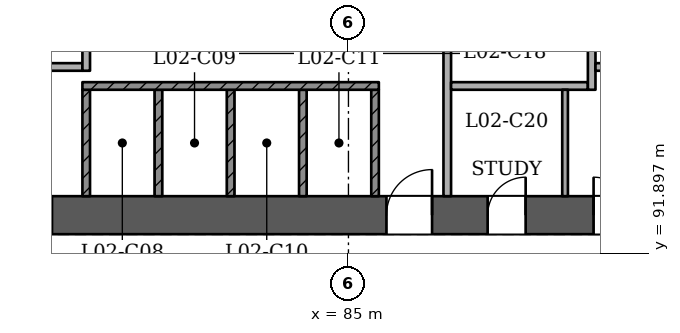
"""IFC4 building model, lengths in metres.
Left out: names, types, materials, properties, quantities, classifications, styles, units other than length and angle.
Written with IfcOpenShell. Run it as: python <this file> out.ifc"""

import sys

from ifc_helpers import new_model, si_unit, direction, frame, frame_2d, origin, place, context, subcontext, project, spatial, rectangle, extrude, element, fill, save


model = new_model("IFC4")
c1 = context("Model", 3, precision=1e-05, world=origin(), true_north=direction((0.0, 1.0)))
c2 = subcontext(c1, "Body", "Model", "MODEL_VIEW")
j1 = project(units=[si_unit("LENGTHUNIT", "METRE"), si_unit("PLANEANGLEUNIT", "RADIAN")], contexts=[c1])
p1 = place(None, origin())
s1 = spatial("IfcSite", under=j1, at=p1, CompositionType="ELEMENT")
p2 = place(p1, origin())
s2 = spatial("IfcBuilding", under=s1, at=p2, CompositionType="ELEMENT")
p3 = place(p2, frame((0.0, 0.0, 13.5)))
s3 = spatial("IfcBuildingStorey", under=s2, at=p3, CompositionType="ELEMENT", Elevation=13.5)
p4 = place(p3, frame((72.5, 92.9, 0.0), z_axis=(0.0, 0.0, 1.0), x_axis=(1.0, 0.0, 0.0)))
e1 = element("IfcWall", 1, at=p4, inside=s3, PredefinedType="SHEAR", context=c2, shape_type="SweptSolid", body=[
    extrude(rectangle(XDim=25.5, YDim=1.0, at=frame_2d((12.75, 0.0))), origin(), (0.0, 0.0, 1.0), 4.5),
])
p5 = place(p4, frame((1.3, 0.0, 0.0)))
e2 = element("IfcOpeningElement", 2, at=p5, cuts=e1, PredefinedType="OPENING", context=c2, shape_type="SweptSolid", body=[
    extrude(rectangle(XDim=1.2, YDim=2.1, at=frame_2d((0.6, 1.05))), frame((0.0, 0.51, 0.0), z_axis=(0.0, -1.0, 0.0), x_axis=(1.0, 0.0, 0.0)), (0.0, 0.0, 1.0), 1.021),
])
p6 = place(p4, frame((3.5, 0.0, 0.0)))
e3 = element("IfcOpeningElement", 3, at=p6, cuts=e1, PredefinedType="OPENING", context=c2, shape_type="SweptSolid", body=[
    extrude(rectangle(XDim=1.2, YDim=2.1, at=frame_2d((0.6, 1.05))), frame((0.0, 0.51, 0.0), z_axis=(0.0, -1.0, 0.0), x_axis=(1.0, 0.0, 0.0)), (0.0, 0.0, 1.0), 1.021),
])
p7 = place(p4, frame((13.5, 0.0, 0.0)))
e4 = element("IfcOpeningElement", 4, at=p7, cuts=e1, PredefinedType="OPENING", context=c2, shape_type="SweptSolid", body=[
    extrude(rectangle(XDim=1.2, YDim=2.1, at=frame_2d((0.6, 1.05))), frame((0.0, 0.51, 0.0), z_axis=(0.0, -1.0, 0.0), x_axis=(1.0, 0.0, 0.0)), (0.0, 0.0, 1.0), 1.021),
])
p8 = place(p4, frame((16.163, 0.0, 0.0)))
e5 = element("IfcOpeningElement", 5, at=p8, cuts=e1, PredefinedType="OPENING", context=c2, shape_type="SweptSolid", body=[
    extrude(rectangle(XDim=1.0, YDim=2.1, at=frame_2d((0.5, 1.05))), frame((0.0, 0.51, 0.0), z_axis=(0.0, -1.0, 0.0), x_axis=(1.0, 0.0, 0.0)), (0.0, 0.0, 1.0), 1.021),
])
p9 = place(p4, frame((18.95, 0.0, 0.0)))
e6 = element("IfcOpeningElement", 6, at=p9, cuts=e1, PredefinedType="OPENING", context=c2, shape_type="SweptSolid", body=[
    extrude(rectangle(XDim=1.0, YDim=2.1, at=frame_2d((0.5, 1.05))), frame((0.0, 0.51, 0.0), z_axis=(0.0, -1.0, 0.0), x_axis=(1.0, 0.0, 0.0)), (0.0, 0.0, 1.0), 1.021),
])
p10 = place(p4, frame((22.137, 0.0, 0.0)))
e7 = element("IfcOpeningElement", 7, at=p10, cuts=e1, PredefinedType="OPENING", context=c2, shape_type="SweptSolid", body=[
    extrude(rectangle(XDim=1.0, YDim=2.1, at=frame_2d((0.5, 1.05))), frame((0.0, 0.51, 0.0), z_axis=(0.0, -1.0, 0.0), x_axis=(1.0, 0.0, 0.0)), (0.0, 0.0, 1.0), 1.021),
])
p11 = place(p3, frame((55.57, 95.474, 0.0), z_axis=(0.0, 0.0, 1.0), x_axis=(0.500000085768, -0.866025354266, 0.0)))
e8 = element("IfcWall", 8, at=p11, inside=s3, PredefinedType="PARTITIONING", context=c2, shape_type="SweptSolid", body=[
    extrude(rectangle(XDim=55.365, YDim=0.15, at=frame_2d((27.682, 0.0))), origin(), (0.0, 0.0, 1.0), 4.05),
])
p12 = place(p11, frame((6.832, 0.0, 0.0)))
e9 = element("IfcOpeningElement", 9, at=p12, cuts=e8, PredefinedType="OPENING", context=c2, shape_type="SweptSolid", body=[
    extrude(rectangle(XDim=1.2, YDim=2.1, at=frame_2d((0.6, 1.05))), frame((0.0, 0.085, 0.0), z_axis=(0.0, -1.0, 0.0), x_axis=(1.0, 0.0, 0.0)), (0.0, 0.0, 1.0), 0.171),
])
p13 = place(p11, frame((14.626, 0.0, 0.0)))
e10 = element("IfcOpeningElement", 10, at=p13, cuts=e8, PredefinedType="OPENING", context=c2, shape_type="SweptSolid", body=[
    extrude(rectangle(XDim=0.9, YDim=2.1, at=frame_2d((0.45, 1.05))), frame((0.0, 0.085, 0.0), z_axis=(0.0, -1.0, 0.0), x_axis=(1.0, 0.0, 0.0)), (0.0, 0.0, 1.0), 0.171),
])
p14 = place(p11, frame((16.876, 0.0, 0.0)))
e11 = element("IfcOpeningElement", 11, at=p14, cuts=e8, PredefinedType="OPENING", context=c2, shape_type="SweptSolid", body=[
    extrude(rectangle(XDim=0.9, YDim=2.1, at=frame_2d((0.45, 1.05))), frame((0.0, 0.085, 0.0), z_axis=(0.0, -1.0, 0.0), x_axis=(1.0, 0.0, 0.0)), (0.0, 0.0, 1.0), 0.171),
])
p15 = place(p11, frame((24.832, 0.0, 0.0)))
e12 = element("IfcOpeningElement", 12, at=p15, cuts=e8, PredefinedType="OPENING", context=c2, shape_type="SweptSolid", body=[
    extrude(rectangle(XDim=1.2, YDim=2.1, at=frame_2d((0.6, 1.05))), frame((0.0, 0.085, 0.0), z_axis=(0.0, -1.0, 0.0), x_axis=(1.0, 0.0, 0.0)), (0.0, 0.0, 1.0), 0.171),
])
p16 = place(p11, frame((36.082, 0.0, 0.0)))
e13 = element("IfcOpeningElement", 13, at=p16, cuts=e8, PredefinedType="OPENING", context=c2, shape_type="SweptSolid", body=[
    extrude(rectangle(XDim=1.2, YDim=2.1, at=frame_2d((0.6, 1.05))), frame((0.0, 0.085, 0.0), z_axis=(0.0, -1.0, 0.0), x_axis=(1.0, 0.0, 0.0)), (0.0, 0.0, 1.0), 0.171),
])
p17 = place(p11, frame((45.082, 0.0, 0.0)))
e14 = element("IfcOpeningElement", 14, at=p17, cuts=e8, PredefinedType="OPENING", context=c2, shape_type="SweptSolid", body=[
    extrude(rectangle(XDim=1.2, YDim=2.1, at=frame_2d((0.6, 1.05))), frame((0.0, 0.085, 0.0), z_axis=(0.0, -1.0, 0.0), x_axis=(1.0, 0.0, 0.0)), (0.0, 0.0, 1.0), 0.171),
])
p18 = place(p11, frame((53.295, 0.0, 0.0)))
e15 = element("IfcOpeningElement", 15, at=p18, cuts=e8, PredefinedType="OPENING", context=c2, shape_type="SweptSolid", body=[
    extrude(rectangle(XDim=1.0, YDim=2.1, at=frame_2d((0.5, 1.05))), frame((0.0, 0.085, 0.0), z_axis=(0.0, -1.0, 0.0), x_axis=(1.0, 0.0, 0.0)), (0.0, 0.0, 1.0), 0.171),
])
p19 = place(p3, frame((86.747, 47.526, 0.0), z_axis=(0.0, 0.0, 1.0), x_axis=(0.500000085768, 0.866025354266, 0.0)))
e16 = element("IfcWall", 16, at=p19, inside=s3, PredefinedType="PARTITIONING", context=c2, shape_type="SweptSolid", body=[
    extrude(rectangle(XDim=55.365, YDim=0.15, at=frame_2d((27.682, 0.0))), origin(), (0.0, 0.0, 1.0), 4.05),
])
p20 = place(p19, frame((0.97, 0.0, 0.0)))
e17 = element("IfcOpeningElement", 17, at=p20, cuts=e16, PredefinedType="OPENING", context=c2, shape_type="SweptSolid", body=[
    extrude(rectangle(XDim=1.2, YDim=2.1, at=frame_2d((0.6, 1.05))), frame((0.0, 0.085, 0.0), z_axis=(0.0, -1.0, 0.0), x_axis=(1.0, 0.0, 0.0)), (0.0, 0.0, 1.0), 0.171),
])
p21 = place(p19, frame((11.332, 0.0, 0.0)))
e18 = element("IfcOpeningElement", 18, at=p21, cuts=e16, PredefinedType="OPENING", context=c2, shape_type="SweptSolid", body=[
    extrude(rectangle(XDim=1.2, YDim=2.1, at=frame_2d((0.6, 1.05))), frame((0.0, 0.085, 0.0), z_axis=(0.0, -1.0, 0.0), x_axis=(1.0, 0.0, 0.0)), (0.0, 0.0, 1.0), 0.171),
])
p22 = place(p19, frame((29.332, 0.0, 0.0)))
e19 = element("IfcOpeningElement", 19, at=p22, cuts=e16, PredefinedType="OPENING", context=c2, shape_type="SweptSolid", body=[
    extrude(rectangle(XDim=1.2, YDim=2.1, at=frame_2d((0.6, 1.05))), frame((0.0, 0.085, 0.0), z_axis=(0.0, -1.0, 0.0), x_axis=(1.0, 0.0, 0.0)), (0.0, 0.0, 1.0), 0.171),
])
p23 = place(p19, frame((42.132, 0.0, 0.0)))
e20 = element("IfcOpeningElement", 20, at=p23, cuts=e16, PredefinedType="OPENING", context=c2, shape_type="SweptSolid", body=[
    extrude(rectangle(XDim=1.2, YDim=2.1, at=frame_2d((0.6, 1.05))), frame((0.0, 0.085, 0.0), z_axis=(0.0, -1.0, 0.0), x_axis=(1.0, 0.0, 0.0)), (0.0, 0.0, 1.0), 0.171),
])
p24 = place(p19, frame((46.569, 0.0, 0.0)))
e21 = element("IfcOpeningElement", 21, at=p24, cuts=e16, PredefinedType="OPENING", context=c2, shape_type="SweptSolid", body=[
    extrude(rectangle(XDim=1.0, YDim=2.1, at=frame_2d((0.5, 1.05))), frame((0.0, 0.085, 0.0), z_axis=(0.0, -1.0, 0.0), x_axis=(1.0, 0.0, 0.0)), (0.0, 0.0, 1.0), 0.171),
])
p25 = place(p19, frame((48.819, 0.0, 0.0)))
e22 = element("IfcOpeningElement", 22, at=p25, cuts=e16, PredefinedType="OPENING", context=c2, shape_type="SweptSolid", body=[
    extrude(rectangle(XDim=1.0, YDim=2.1, at=frame_2d((0.5, 1.05))), frame((0.0, 0.085, 0.0), z_axis=(0.0, -1.0, 0.0), x_axis=(1.0, 0.0, 0.0)), (0.0, 0.0, 1.0), 0.171),
])
p26 = place(p19, frame((51.837, 0.0, 0.0)))
e23 = element("IfcOpeningElement", 23, at=p26, cuts=e16, PredefinedType="OPENING", context=c2, shape_type="SweptSolid", body=[
    extrude(rectangle(XDim=1.2, YDim=2.1, at=frame_2d((0.6, 1.05))), frame((0.0, 0.085, 0.0), z_axis=(0.0, -1.0, 0.0), x_axis=(1.0, 0.0, 0.0)), (0.0, 0.0, 1.0), 0.171),
])
p27 = place(p3, frame((79.673, 41.126, 0.0), z_axis=(0.0, 0.0, 1.0), x_axis=(-0.499997306052, 0.866026959131, 0.0)))
e24 = element("IfcWall", 24, at=p27, inside=s3, PredefinedType="SOLIDWALL", context=c2, shape_type="SweptSolid", body=[
    extrude(rectangle(XDim=62.87, YDim=0.4, at=frame_2d((31.435, 0.0))), origin(), (0.0, 0.0, 1.0), 4.05),
])
p28 = place(p27, frame((54.986, 0.0, 0.9)))
e25 = element("IfcOpeningElement", 25, at=p28, cuts=e24, PredefinedType="OPENING", context=c2, shape_type="SweptSolid", body=[
    extrude(rectangle(XDim=2.4, YDim=1.5, at=frame_2d((1.2, 0.75))), frame((0.0, 0.21, 0.0), z_axis=(0.0, -1.0, 0.0), x_axis=(1.0, 0.0, 0.0)), (0.0, 0.0, 1.0), 0.421),
])
p29 = place(p27, frame((50.486, 0.0, 0.9)))
e26 = element("IfcOpeningElement", 26, at=p29, cuts=e24, PredefinedType="OPENING", context=c2, shape_type="SweptSolid", body=[
    extrude(rectangle(XDim=2.4, YDim=1.5, at=frame_2d((1.2, 0.75))), frame((0.0, 0.21, 0.0), z_axis=(0.0, -1.0, 0.0), x_axis=(1.0, 0.0, 0.0)), (0.0, 0.0, 1.0), 0.421),
])
p30 = place(p27, frame((45.986, 0.0, 0.9)))
e27 = element("IfcOpeningElement", 27, at=p30, cuts=e24, PredefinedType="OPENING", context=c2, shape_type="SweptSolid", body=[
    extrude(rectangle(XDim=2.4, YDim=1.5, at=frame_2d((1.2, 0.75))), frame((0.0, 0.21, 0.0), z_axis=(0.0, -1.0, 0.0), x_axis=(1.0, 0.0, 0.0)), (0.0, 0.0, 1.0), 0.421),
])
p31 = place(p27, frame((32.486, 0.0, 0.9)))
e28 = element("IfcOpeningElement", 28, at=p31, cuts=e24, PredefinedType="OPENING", context=c2, shape_type="SweptSolid", body=[
    extrude(rectangle(XDim=2.4, YDim=1.5, at=frame_2d((1.2, 0.75))), frame((0.0, 0.21, 0.0), z_axis=(0.0, -1.0, 0.0), x_axis=(1.0, 0.0, 0.0)), (0.0, 0.0, 1.0), 0.421),
])
p32 = place(p27, frame((27.986, 0.0, 0.9)))
e29 = element("IfcOpeningElement", 29, at=p32, cuts=e24, PredefinedType="OPENING", context=c2, shape_type="SweptSolid", body=[
    extrude(rectangle(XDim=2.4, YDim=1.5, at=frame_2d((1.2, 0.75))), frame((0.0, 0.21, 0.0), z_axis=(0.0, -1.0, 0.0), x_axis=(1.0, 0.0, 0.0)), (0.0, 0.0, 1.0), 0.421),
])
p33 = place(p27, frame((23.486, 0.0, 0.9)))
e30 = element("IfcOpeningElement", 30, at=p33, cuts=e24, PredefinedType="OPENING", context=c2, shape_type="SweptSolid", body=[
    extrude(rectangle(XDim=2.4, YDim=1.5, at=frame_2d((1.2, 0.75))), frame((0.0, 0.21, 0.0), z_axis=(0.0, -1.0, 0.0), x_axis=(1.0, 0.0, 0.0)), (0.0, 0.0, 1.0), 0.421),
])
p34 = place(p27, frame((18.986, 0.0, 0.9)))
e31 = element("IfcOpeningElement", 31, at=p34, cuts=e24, PredefinedType="OPENING", context=c2, shape_type="SweptSolid", body=[
    extrude(rectangle(XDim=2.4, YDim=1.5, at=frame_2d((1.2, 0.75))), frame((0.0, 0.21, 0.0), z_axis=(0.0, -1.0, 0.0), x_axis=(1.0, 0.0, 0.0)), (0.0, 0.0, 1.0), 0.421),
])
p35 = place(p27, frame((14.486, 0.0, 0.9)))
e32 = element("IfcOpeningElement", 32, at=p35, cuts=e24, PredefinedType="OPENING", context=c2, shape_type="SweptSolid", body=[
    extrude(rectangle(XDim=2.4, YDim=1.5, at=frame_2d((1.2, 0.75))), frame((0.0, 0.21, 0.0), z_axis=(0.0, -1.0, 0.0), x_axis=(1.0, 0.0, 0.0)), (0.0, 0.0, 1.0), 0.421),
])
p36 = place(p3, frame((121.762, 95.574, 0.0), z_axis=(0.0, 0.0, 1.0), x_axis=(-0.499997306052, -0.866026959131, 0.0)))
e33 = element("IfcWall", 33, at=p36, inside=s3, PredefinedType="SOLIDWALL", context=c2, shape_type="SweptSolid", body=[
    extrude(rectangle(XDim=62.87, YDim=0.4, at=frame_2d((31.435, 0.0))), origin(), (0.0, 0.0, 1.0), 4.05),
])
p37 = place(p36, frame((59.452, 0.0, 0.9)))
e34 = element("IfcOpeningElement", 34, at=p37, cuts=e33, PredefinedType="OPENING", context=c2, shape_type="SweptSolid", body=[
    extrude(rectangle(XDim=2.4, YDim=1.5, at=frame_2d((1.2, 0.75))), frame((0.0, 0.21, 0.0), z_axis=(0.0, -1.0, 0.0), x_axis=(1.0, 0.0, 0.0)), (0.0, 0.0, 1.0), 0.421),
])
p38 = place(p36, frame((54.986, 0.0, 0.9)))
e35 = element("IfcOpeningElement", 35, at=p38, cuts=e33, PredefinedType="OPENING", context=c2, shape_type="SweptSolid", body=[
    extrude(rectangle(XDim=2.4, YDim=1.5, at=frame_2d((1.2, 0.75))), frame((0.0, 0.21, 0.0), z_axis=(0.0, -1.0, 0.0), x_axis=(1.0, 0.0, 0.0)), (0.0, 0.0, 1.0), 0.421),
])
p39 = place(p36, frame((50.486, 0.0, 0.9)))
e36 = element("IfcOpeningElement", 36, at=p39, cuts=e33, PredefinedType="OPENING", context=c2, shape_type="SweptSolid", body=[
    extrude(rectangle(XDim=2.4, YDim=1.5, at=frame_2d((1.2, 0.75))), frame((0.0, 0.21, 0.0), z_axis=(0.0, -1.0, 0.0), x_axis=(1.0, 0.0, 0.0)), (0.0, 0.0, 1.0), 0.421),
])
p40 = place(p36, frame((45.986, 0.0, 0.9)))
e37 = element("IfcOpeningElement", 37, at=p40, cuts=e33, PredefinedType="OPENING", context=c2, shape_type="SweptSolid", body=[
    extrude(rectangle(XDim=2.4, YDim=1.5, at=frame_2d((1.2, 0.75))), frame((0.0, 0.21, 0.0), z_axis=(0.0, -1.0, 0.0), x_axis=(1.0, 0.0, 0.0)), (0.0, 0.0, 1.0), 0.421),
])
p41 = place(p36, frame((41.486, 0.0, 0.9)))
e38 = element("IfcOpeningElement", 38, at=p41, cuts=e33, PredefinedType="OPENING", context=c2, shape_type="SweptSolid", body=[
    extrude(rectangle(XDim=2.4, YDim=1.5, at=frame_2d((1.2, 0.75))), frame((0.0, 0.21, 0.0), z_axis=(0.0, -1.0, 0.0), x_axis=(1.0, 0.0, 0.0)), (0.0, 0.0, 1.0), 0.421),
])
p42 = place(p36, frame((36.986, 0.0, 0.9)))
e39 = element("IfcOpeningElement", 39, at=p42, cuts=e33, PredefinedType="OPENING", context=c2, shape_type="SweptSolid", body=[
    extrude(rectangle(XDim=2.4, YDim=1.5, at=frame_2d((1.2, 0.75))), frame((0.0, 0.21, 0.0), z_axis=(0.0, -1.0, 0.0), x_axis=(1.0, 0.0, 0.0)), (0.0, 0.0, 1.0), 0.421),
])
p43 = place(p36, frame((23.486, 0.0, 0.9)))
e40 = element("IfcOpeningElement", 40, at=p43, cuts=e33, PredefinedType="OPENING", context=c2, shape_type="SweptSolid", body=[
    extrude(rectangle(XDim=2.4, YDim=1.5, at=frame_2d((1.2, 0.75))), frame((0.0, 0.21, 0.0), z_axis=(0.0, -1.0, 0.0), x_axis=(1.0, 0.0, 0.0)), (0.0, 0.0, 1.0), 0.421),
])
p44 = place(p36, frame((18.986, 0.0, 0.9)))
e41 = element("IfcOpeningElement", 41, at=p44, cuts=e33, PredefinedType="OPENING", context=c2, shape_type="SweptSolid", body=[
    extrude(rectangle(XDim=2.4, YDim=1.5, at=frame_2d((1.2, 0.75))), frame((0.0, 0.21, 0.0), z_axis=(0.0, -1.0, 0.0), x_axis=(1.0, 0.0, 0.0)), (0.0, 0.0, 1.0), 0.421),
])
p45 = place(p36, frame((14.486, 0.0, 0.9)))
e42 = element("IfcOpeningElement", 42, at=p45, cuts=e33, PredefinedType="OPENING", context=c2, shape_type="SweptSolid", body=[
    extrude(rectangle(XDim=2.4, YDim=1.5, at=frame_2d((1.2, 0.75))), frame((0.0, 0.21, 0.0), z_axis=(0.0, -1.0, 0.0), x_axis=(1.0, 0.0, 0.0)), (0.0, 0.0, 1.0), 0.421),
])
p46 = place(p36, frame((5.486, 0.0, 0.9)))
e43 = element("IfcOpeningElement", 43, at=p46, cuts=e33, PredefinedType="OPENING", context=c2, shape_type="SweptSolid", body=[
    extrude(rectangle(XDim=2.4, YDim=1.5, at=frame_2d((1.2, 0.75))), frame((0.0, 0.21, 0.0), z_axis=(0.0, -1.0, 0.0), x_axis=(1.0, 0.0, 0.0)), (0.0, 0.0, 1.0), 0.421),
])
p47 = place(p36, frame((1.018, 0.0, 0.9)))
e44 = element("IfcOpeningElement", 44, at=p47, cuts=e33, PredefinedType="OPENING", context=c2, shape_type="SweptSolid", body=[
    extrude(rectangle(XDim=2.4, YDim=1.5, at=frame_2d((1.2, 0.75))), frame((0.0, 0.21, 0.0), z_axis=(0.0, -1.0, 0.0), x_axis=(1.0, 0.0, 0.0)), (0.0, 0.0, 1.0), 0.421),
])
for number, where, z_axis, x_axis in (
    (45, (78.1, 93.4, 0.0), (0.0, 0.0, 1.0), (0.0, 1.0, 0.0)),
    (46, (80.0, 93.4, 0.0), (0.0, 0.0, 1.0), (0.0, 1.0, 0.0)),
    (47, (81.9, 93.4, 0.0), (0.0, 0.0, 1.0), (0.0, 1.0, 0.0)),
    (48, (83.8, 93.4, 0.0), (0.0, 0.0, 1.0), (0.0, 1.0, 0.0)),
    (49, (85.7, 93.4, 0.0), (0.0, 0.0, 1.0), (0.0, 1.0, 0.0)),
):
    element("IfcWall", number, at=place(p3, frame(where, z_axis=z_axis, x_axis=x_axis)), inside=s3, PredefinedType="SOLIDWALL", context=c2, shape_type="SweptSolid", body=[
        extrude(rectangle(XDim=2.8, YDim=0.2, at=frame_2d((1.4, 0.0))), origin(), (0.0, 0.0, 1.0), 4.05),
    ])
p48 = place(p3, frame((87.6, 93.4, 0.0), z_axis=(0.0, 0.0, 1.0), x_axis=(0.0, 1.0, 0.0)))
e50 = element("IfcWall", 50, at=p48, inside=s3, PredefinedType="PARTITIONING", context=c2, shape_type="SweptSolid", body=[
    extrude(rectangle(XDim=7.0, YDim=0.2, at=frame_2d((3.5, 0.0))), origin(), (0.0, 0.0, 1.0), 4.05),
])
p49 = place(p48, frame((4.45, 0.0, 0.0)))
e51 = element("IfcOpeningElement", 51, at=p49, cuts=e50, PredefinedType="OPENING", context=c2, shape_type="SweptSolid", body=[
    extrude(rectangle(XDim=1.1, YDim=2.1, at=frame_2d((0.55, 1.05))), frame((0.0, 0.11, 0.0), z_axis=(0.0, -1.0, 0.0), x_axis=(1.0, 0.0, 0.0)), (0.0, 0.0, 1.0), 0.221),
])
p50 = place(p3, frame((90.7, 93.4, 0.0), z_axis=(0.0, 0.0, 1.0), x_axis=(0.0, 1.0, 0.0)))
e52 = element("IfcWall", 52, at=p50, inside=s3, PredefinedType="PARTITIONING", context=c2, shape_type="SweptSolid", body=[
    extrude(rectangle(XDim=2.8, YDim=0.15, at=frame_2d((1.4, 0.0))), origin(), (0.0, 0.0, 1.0), 4.05),
])
p51 = place(p3, frame((78.0, 96.3, 0.0), z_axis=(0.0, 0.0, 1.0), x_axis=(1.0, 0.0, 0.0)))
e53 = element("IfcWall", 53, at=p51, inside=s3, PredefinedType="SOLIDWALL", context=c2, shape_type="SweptSolid", body=[
    extrude(rectangle(XDim=7.8, YDim=0.2, at=frame_2d((3.9, 0.0))), origin(), (0.0, 0.0, 1.0), 4.05),
])
p52 = place(p3, frame((87.7, 96.3, 0.0), z_axis=(0.0, 0.0, 1.0), x_axis=(1.0, 0.0, 0.0)))
e54 = element("IfcWall", 54, at=p52, inside=s3, PredefinedType="PARTITIONING", context=c2, shape_type="SweptSolid", body=[
    extrude(rectangle(XDim=3.6, YDim=0.2, at=frame_2d((1.8, 0.0))), origin(), (0.0, 0.0, 1.0), 4.05),
])
p53 = place(p3, frame((91.4, 96.2, 0.0), z_axis=(0.0, 0.0, 1.0), x_axis=(0.0, 1.0, 0.0)))
e55 = element("IfcWall", 55, at=p53, inside=s3, PredefinedType="PARTITIONING", context=c2, shape_type="SweptSolid", body=[
    extrude(rectangle(XDim=4.2, YDim=0.2, at=frame_2d((2.1, 0.0))), origin(), (0.0, 0.0, 1.0), 4.05),
])
p54 = place(p53, frame((2.45, 0.0, 0.0)))
e56 = element("IfcOpeningElement", 56, at=p54, cuts=e55, PredefinedType="OPENING", context=c2, shape_type="SweptSolid", body=[
    extrude(rectangle(XDim=1.1, YDim=2.1, at=frame_2d((0.55, 1.05))), frame((0.0, 0.11, 0.0), z_axis=(0.0, -1.0, 0.0), x_axis=(1.0, 0.0, 0.0)), (0.0, 0.0, 1.0), 0.221),
])
p55 = place(p3, frame((76.1, 96.8, 0.0), z_axis=(0.0, 0.0, 1.0), x_axis=(1.0, 0.0, 0.0)))
e57 = element("IfcWall", 57, at=p55, inside=s3, PredefinedType="PARTITIONING", context=c2, shape_type="SweptSolid", body=[
    extrude(rectangle(XDim=1.9, YDim=0.2, at=frame_2d((0.95, 0.0))), origin(), (0.0, 0.0, 1.0), 4.05),
])
p56 = place(p3, frame((78.1, 96.7, 0.0), z_axis=(0.0, 0.0, 1.0), x_axis=(0.0, 1.0, 0.0)))
e58 = element("IfcWall", 58, at=p56, inside=s3, PredefinedType="PARTITIONING", context=c2, shape_type="SweptSolid", body=[
    extrude(rectangle(XDim=3.7, YDim=0.2, at=frame_2d((1.85, 0.0))), origin(), (0.0, 0.0, 1.0), 4.05),
])
p57 = place(p56, frame((1.95, 0.0, 0.0)))
e59 = element("IfcOpeningElement", 59, at=p57, cuts=e58, PredefinedType="OPENING", context=c2, shape_type="SweptSolid", body=[
    extrude(rectangle(XDim=1.1, YDim=2.1, at=frame_2d((0.55, 1.05))), frame((0.0, 0.11, 0.0), z_axis=(0.0, -1.0, 0.0), x_axis=(1.0, 0.0, 0.0)), (0.0, 0.0, 1.0), 0.221),
])
p58 = place(p3, frame((91.5, 96.8, 0.0), z_axis=(0.0, 0.0, 1.0), x_axis=(1.0, 0.0, 0.0)))
e60 = element("IfcWall", 60, at=p58, inside=s3, PredefinedType="PARTITIONING", context=c2, shape_type="SweptSolid", body=[
    extrude(rectangle(XDim=2.4, YDim=0.2, at=frame_2d((1.2, 0.0))), origin(), (0.0, 0.0, 1.0), 4.05),
])
p59 = place(p6, origin())
e61 = element("IfcDoor", 61, at=p59, inside=s3, OperationType="SINGLE_SWING_LEFT", PredefinedType="NOTDEFINED", context=c2, shape_type="SweptSolid", body=[
    extrude(rectangle(XDim=1.2, YDim=2.1, at=frame_2d((0.6, 1.05))), frame((0.0, 0.025, 0.0), z_axis=(0.0, -1.0, 0.0), x_axis=(1.0, 0.0, 0.0)), (0.0, 0.0, 1.0), 0.05),
])
fill(e3, e61)
p60 = place(p7, origin())
e62 = element("IfcDoor", 62, at=p60, inside=s3, OperationType="SINGLE_SWING_RIGHT", PredefinedType="NOTDEFINED", context=c2, shape_type="SweptSolid", body=[
    extrude(rectangle(XDim=1.2, YDim=2.1, at=frame_2d((0.6, 1.05))), frame((0.0, 0.025, 0.0), z_axis=(0.0, -1.0, 0.0), x_axis=(1.0, 0.0, 0.0)), (0.0, 0.0, 1.0), 0.05),
])
fill(e4, e62)
p61 = place(p8, origin())
e63 = element("IfcDoor", 63, at=p61, inside=s3, OperationType="SINGLE_SWING_RIGHT", PredefinedType="NOTDEFINED", context=c2, shape_type="SweptSolid", body=[
    extrude(rectangle(XDim=1.0, YDim=2.1, at=frame_2d((0.5, 1.05))), frame((0.0, 0.025, 0.0), z_axis=(0.0, -1.0, 0.0), x_axis=(1.0, 0.0, 0.0)), (0.0, 0.0, 1.0), 0.05),
])
fill(e5, e63)
p62 = place(p9, origin())
e64 = element("IfcDoor", 64, at=p62, inside=s3, OperationType="SINGLE_SWING_LEFT", PredefinedType="NOTDEFINED", context=c2, shape_type="SweptSolid", body=[
    extrude(rectangle(XDim=1.0, YDim=2.1, at=frame_2d((0.5, 1.05))), frame((0.0, 0.025, 0.0), z_axis=(0.0, -1.0, 0.0), x_axis=(1.0, 0.0, 0.0)), (0.0, 0.0, 1.0), 0.05),
])
fill(e6, e64)
save(model, sys.argv[1])
